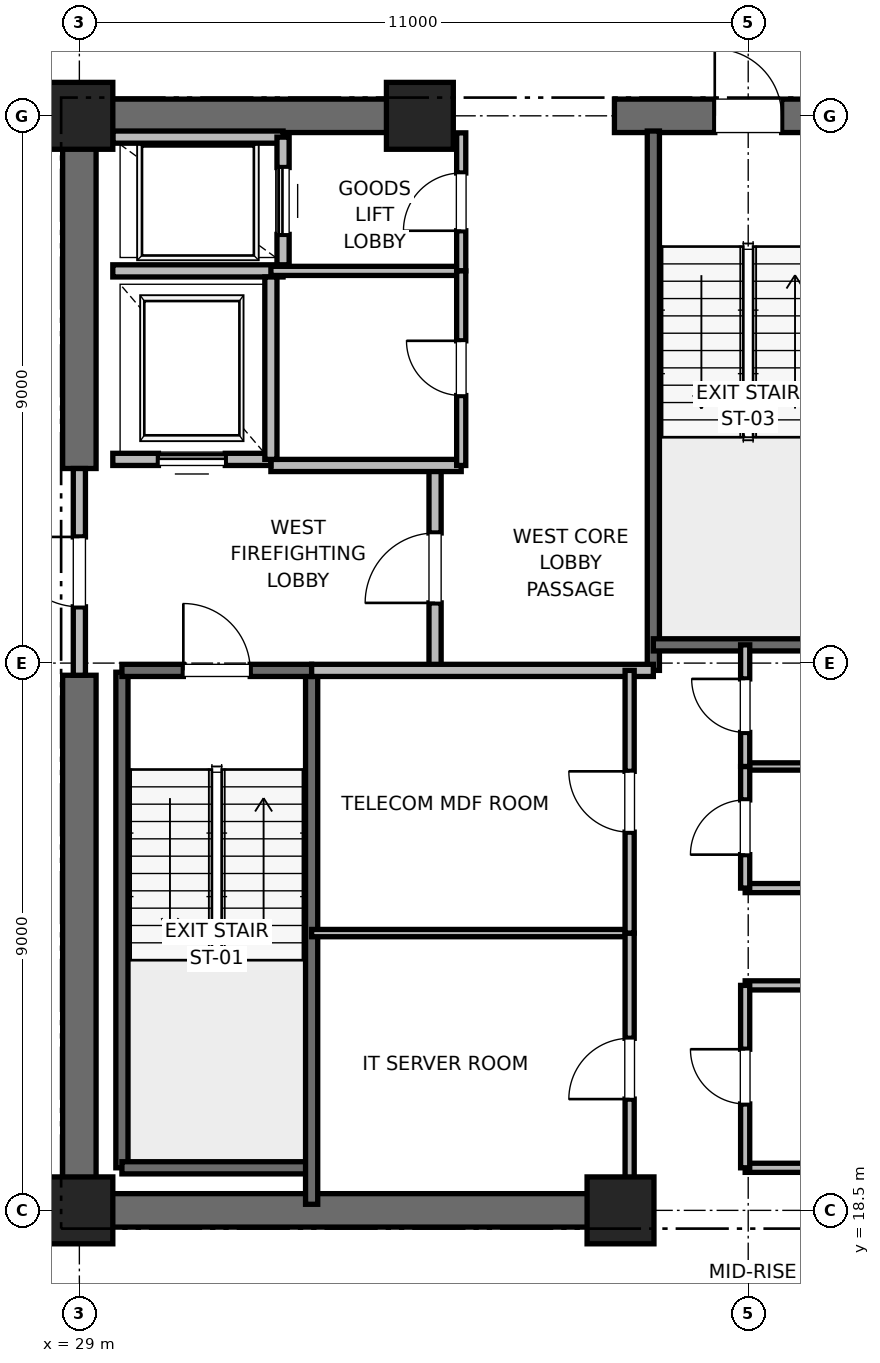
"""IFC4 building model, lengths in metres.
Left out: names, types, materials, properties, quantities, classifications, styles, units other than length and angle.
Written with IfcOpenShell. Run it as: python <this file> out.ifc"""

import sys

from ifc_helpers import new_model, si_unit, direction, frame, frame_2d, origin, origin_2d, place, context, subcontext, project, spatial, rectangle, extrude, element, fill, save


model = new_model("IFC4")
c1 = context("Model", 3, precision=1e-05, world=origin(), true_north=direction((0.0, 1.0)))
c2 = subcontext(c1, "Body", "Model", "MODEL_VIEW")
j1 = project(units=[si_unit("LENGTHUNIT", "METRE"), si_unit("PLANEANGLEUNIT", "RADIAN")], contexts=[c1])
p1 = place(None, origin())
s1 = spatial("IfcSite", under=j1, at=p1, CompositionType="ELEMENT")
p2 = place(p1, origin())
s2 = spatial("IfcBuilding", under=s1, at=p2, CompositionType="ELEMENT")
p3 = place(p2, frame((0.0, 0.0, 132.4)))
s3 = spatial("IfcBuildingStorey", under=s2, at=p3, CompositionType="ELEMENT", Elevation=132.4)
for number, where, z_axis, x_axis in (
    (1, (29.0, 18.5, 0.0), (0.0, 0.0, 1.0), (1.0, 0.0, 0.0)),
    (2, (29.0, 36.5, 0.0), (0.0, 0.0, 1.0), (1.0, 0.0, 0.0)),
    (3, (37.9, 18.5, 0.0), (0.0, 0.0, 1.0), (1.0, 0.0, 0.0)),
    (4, (34.6, 36.5, 0.0), (0.0, 0.0, 1.0), (1.0, 0.0, 0.0)),
):
    element("IfcColumn", number, at=place(p3, frame(where, z_axis=z_axis, x_axis=x_axis)), inside=s3, PredefinedType="PILASTER", context=c2, shape_type="SweptSolid", body=[
        extrude(rectangle(XDim=1.1, YDim=1.1, at=origin_2d()), origin(), (0.0, 0.0, 1.0), 4.0),
    ])
p4 = place(p3, frame((29.0, 18.5, 0.0), z_axis=(0.0, 0.0, 1.0), x_axis=(1.0, 0.0, 0.0)))
e5 = element("IfcWall", 5, at=p4, inside=s3, PredefinedType="SHEAR", context=c2, shape_type="SweptSolid", body=[
    extrude(rectangle(XDim=9.2, YDim=0.55, at=frame_2d((4.6, 0.0))), origin(), (0.0, 0.0, 1.0), 3.775),
])
p5 = place(p3, frame((29.0, 36.5, 0.0), z_axis=(0.0, 0.0, 1.0), x_axis=(1.0, 0.0, 0.0)))
e6 = element("IfcWall", 6, at=p5, inside=s3, PredefinedType="SHEAR", context=c2, shape_type="SweptSolid", body=[
    extrude(rectangle(XDim=5.8, YDim=0.55, at=frame_2d((2.9, 0.0))), origin(), (0.0, 0.0, 1.0), 3.775),
])
p6 = place(p3, frame((37.8, 36.5, 0.0), z_axis=(0.0, 0.0, 1.0), x_axis=(1.0, 0.0, 0.0)))
e7 = element("IfcWall", 7, at=p6, inside=s3, PredefinedType="SHEAR", context=c2, shape_type="SweptSolid", body=[
    extrude(rectangle(XDim=4.4, YDim=0.55, at=frame_2d((2.2, 0.0))), origin(), (0.0, 0.0, 1.0), 3.775),
])
p7 = place(p6, frame((1.65, 0.0, 0.0)))
e8 = element("IfcOpeningElement", 8, at=p7, cuts=e7, PredefinedType="OPENING", context=c2, shape_type="SweptSolid", body=[
    extrude(rectangle(XDim=1.1, YDim=2.15, at=frame_2d((0.55, 1.075))), frame((0.0, 0.275, 0.0), z_axis=(0.0, -1.0, 0.0), x_axis=(1.0, 0.0, 0.0)), (0.0, 0.0, 1.0), 0.55),
])
p8 = place(p3, frame((29.0, 18.5, 0.0), z_axis=(0.0, 0.0, 1.0), x_axis=(0.0, 1.0, 0.0)))
e9 = element("IfcWall", 9, at=p8, inside=s3, PredefinedType="SHEAR", context=c2, shape_type="SweptSolid", body=[
    extrude(rectangle(XDim=8.8, YDim=0.55, at=frame_2d((4.4, 0.0))), origin(), (0.0, 0.0, 1.0), 3.775),
])
p9 = place(p3, frame((29.0, 30.7, 0.0), z_axis=(0.0, 0.0, 1.0), x_axis=(0.0, 1.0, 0.0)))
e10 = element("IfcWall", 10, at=p9, inside=s3, PredefinedType="SHEAR", context=c2, shape_type="SweptSolid", body=[
    extrude(rectangle(XDim=5.8, YDim=0.55, at=frame_2d((2.9, 0.0))), origin(), (0.0, 0.0, 1.0), 3.775),
])
p10 = place(p3, frame((29.7, 19.2, 0.0), z_axis=(0.0, 0.0, 1.0), x_axis=(0.0, 1.0, 0.0)))
e11 = element("IfcWall", 11, at=p10, inside=s3, PredefinedType="SOLIDWALL", context=c2, shape_type="SweptSolid", body=[
    extrude(rectangle(XDim=8.15, YDim=0.2, at=frame_2d((4.075, 0.0))), origin(), (0.0, 0.0, 1.0), 3.775),
])
p11 = place(p3, frame((29.7, 19.2, 0.0), z_axis=(0.0, 0.0, 1.0), x_axis=(1.0, 0.0, 0.0)))
e12 = element("IfcWall", 12, at=p11, inside=s3, PredefinedType="SOLIDWALL", context=c2, shape_type="SweptSolid", body=[
    extrude(rectangle(XDim=3.12, YDim=0.2, at=frame_2d((1.56, 0.0))), origin(), (0.0, 0.0, 1.0), 3.775),
])
p12 = place(p3, frame((32.82, 18.6, 0.0), z_axis=(0.0, 0.0, 1.0), x_axis=(0.0, 1.0, 0.0)))
e13 = element("IfcWall", 13, at=p12, inside=s3, PredefinedType="SOLIDWALL", context=c2, shape_type="SweptSolid", body=[
    extrude(rectangle(XDim=8.78, YDim=0.2, at=frame_2d((4.39, 0.0))), origin(), (0.0, 0.0, 1.0), 3.775),
])
p13 = place(p3, frame((29.7, 27.38, 0.0), z_axis=(0.0, 0.0, 1.0), x_axis=(1.0, 0.0, 0.0)))
e14 = element("IfcWall", 14, at=p13, inside=s3, PredefinedType="SOLIDWALL", context=c2, shape_type="SweptSolid", body=[
    extrude(rectangle(XDim=3.12, YDim=0.2, at=frame_2d((1.56, 0.0))), origin(), (0.0, 0.0, 1.0), 3.775),
])
p14 = place(p13, frame((1.01, 0.0, 0.0)))
e15 = element("IfcOpeningElement", 15, at=p14, cuts=e14, PredefinedType="OPENING", context=c2, shape_type="SweptSolid", body=[
    extrude(rectangle(XDim=1.1, YDim=2.15, at=frame_2d((0.55, 1.075))), frame((0.0, 0.1, 0.0), z_axis=(0.0, -1.0, 0.0), x_axis=(1.0, 0.0, 0.0)), (0.0, 0.0, 1.0), 0.2),
])
p15 = place(p3, frame((38.44, 27.38, 0.0), z_axis=(0.0, 0.0, 1.0), x_axis=(0.0, 1.0, 0.0)))
e16 = element("IfcWall", 16, at=p15, inside=s3, PredefinedType="SOLIDWALL", context=c2, shape_type="SweptSolid", body=[
    extrude(rectangle(XDim=8.87, YDim=0.2, at=frame_2d((4.435, 0.0))), origin(), (0.0, 0.0, 1.0), 3.775),
])
p16 = place(p3, frame((38.44, 27.8, 0.0), z_axis=(0.0, 0.0, 1.0), x_axis=(1.0, 0.0, 0.0)))
e17 = element("IfcWall", 17, at=p16, inside=s3, PredefinedType="SOLIDWALL", context=c2, shape_type="SweptSolid", body=[
    extrude(rectangle(XDim=3.32, YDim=0.2, at=frame_2d((1.66, 0.0))), origin(), (0.0, 0.0, 1.0), 3.775),
])
p17 = place(p3, frame((34.85, 27.38, 0.0), z_axis=(0.0, 0.0, 1.0), x_axis=(0.0, 1.0, 0.0)))
e18 = element("IfcWall", 18, at=p17, inside=s3, PredefinedType="PARTITIONING", context=c2, shape_type="SweptSolid", body=[
    extrude(rectangle(XDim=3.37, YDim=0.2, at=frame_2d((1.685, 0.0))), origin(), (0.0, 0.0, 1.0), 3.775),
])
p18 = place(p17, frame((1.11, 0.0, 0.0)))
e19 = element("IfcOpeningElement", 19, at=p18, cuts=e18, PredefinedType="OPENING", context=c2, shape_type="SweptSolid", body=[
    extrude(rectangle(XDim=1.15, YDim=2.2, at=frame_2d((0.575, 1.1))), frame((0.0, 0.1, 0.0), z_axis=(0.0, -1.0, 0.0), x_axis=(1.0, 0.0, 0.0)), (0.0, 0.0, 1.0), 0.2),
])
p19 = place(p3, frame((29.0, 27.3, 0.0), z_axis=(0.0, 0.0, 1.0), x_axis=(0.0, 1.0, 0.0)))
e20 = element("IfcWall", 20, at=p19, inside=s3, PredefinedType="PARTITIONING", context=c2, shape_type="SweptSolid", body=[
    extrude(rectangle(XDim=3.4, YDim=0.2, at=frame_2d((1.7, 0.0))), origin(), (0.0, 0.0, 1.0), 2.755),
])
p20 = place(p19, frame((1.125, 0.0, 0.0)))
e21 = element("IfcOpeningElement", 21, at=p20, cuts=e20, PredefinedType="OPENING", context=c2, shape_type="SweptSolid", body=[
    extrude(rectangle(XDim=1.15, YDim=2.2, at=frame_2d((0.575, 1.1))), frame((0.0, 0.1, 0.0), z_axis=(0.0, -1.0, 0.0), x_axis=(1.0, 0.0, 0.0)), (0.0, 0.0, 1.0), 0.2),
])
p21 = place(p3, frame((32.82, 27.38, 0.0), z_axis=(0.0, 0.0, 1.0), x_axis=(1.0, 0.0, 0.0)))
e22 = element("IfcWall", 22, at=p21, inside=s3, PredefinedType="PARTITIONING", context=c2, shape_type="SweptSolid", body=[
    extrude(rectangle(XDim=5.62, YDim=0.2, at=frame_2d((2.81, 0.0))), origin(), (0.0, 0.0, 1.0), 3.775),
])
p22 = place(p3, frame((32.15, 30.75, 0.0), z_axis=(0.0, 0.0, 1.0), x_axis=(1.0, 0.0, 0.0)))
e23 = element("IfcWall", 23, at=p22, inside=s3, PredefinedType="PARTITIONING", context=c2, shape_type="SweptSolid", body=[
    extrude(rectangle(XDim=3.13, YDim=0.2, at=frame_2d((1.565, 0.0))), origin(), (0.0, 0.0, 1.0), 3.775),
])
p23 = place(p3, frame((29.55, 30.85, 0.0), z_axis=(0.0, 0.0, 1.0), x_axis=(1.0, 0.0, 0.0)))
e24 = element("IfcWall", 24, at=p23, inside=s3, PredefinedType="SOLIDWALL", context=c2, shape_type="SweptSolid", body=[
    extrude(rectangle(XDim=2.6, YDim=0.2, at=frame_2d((1.3, 0.0))), origin(), (0.0, 0.0, 1.0), 2.755),
])
p24 = place(p23, frame((0.75, 0.0, 0.0)))
e25 = element("IfcOpeningElement", 25, at=p24, cuts=e24, PredefinedType="OPENING", context=c2, shape_type="SweptSolid", body=[
    extrude(rectangle(XDim=1.1, YDim=2.2, at=frame_2d((0.55, 1.1))), frame((0.0, 0.1, 0.0), z_axis=(0.0, -1.0, 0.0), x_axis=(1.0, 0.0, 0.0)), (0.0, 0.0, 1.0), 0.2),
])
p25 = place(p3, frame((29.55, 33.95, 0.0), z_axis=(0.0, 0.0, 1.0), x_axis=(1.0, 0.0, 0.0)))
e26 = element("IfcWall", 26, at=p25, inside=s3, PredefinedType="SOLIDWALL", context=c2, shape_type="SweptSolid", body=[
    extrude(rectangle(XDim=2.8, YDim=0.2, at=frame_2d((1.4, 0.0))), origin(), (0.0, 0.0, 1.0), 3.775),
])
p26 = place(p3, frame((32.15, 30.85, 0.0), z_axis=(0.0, 0.0, 1.0), x_axis=(0.0, 1.0, 0.0)))
e27 = element("IfcWall", 27, at=p26, inside=s3, PredefinedType="SOLIDWALL", context=c2, shape_type="SweptSolid", body=[
    extrude(rectangle(XDim=3.0, YDim=0.2, at=frame_2d((1.5, 0.0))), origin(), (0.0, 0.0, 1.0), 3.775),
])
p27 = place(p3, frame((32.35, 36.15, 0.0), z_axis=(0.0, 0.0, 1.0), x_axis=(-1.0, 0.0, 0.0)))
e28 = element("IfcWall", 28, at=p27, inside=s3, PredefinedType="SOLIDWALL", context=c2, shape_type="SweptSolid", body=[
    extrude(rectangle(XDim=2.8, YDim=0.2, at=frame_2d((1.4, 0.0))), origin(), (0.0, 0.0, 1.0), 2.985),
])
p28 = place(p3, frame((32.35, 34.05, 0.0), z_axis=(0.0, 0.0, 1.0), x_axis=(0.0, 1.0, 0.0)))
e29 = element("IfcWall", 29, at=p28, inside=s3, PredefinedType="SOLIDWALL", context=c2, shape_type="SweptSolid", body=[
    extrude(rectangle(XDim=2.1, YDim=0.2, at=frame_2d((1.05, 0.0))), origin(), (0.0, 0.0, 1.0), 3.775),
])
p29 = place(p28, frame((0.5, 0.0, 0.0)))
e30 = element("IfcOpeningElement", 30, at=p29, cuts=e29, PredefinedType="OPENING", context=c2, shape_type="SweptSolid", body=[
    extrude(rectangle(XDim=1.1, YDim=2.2, at=frame_2d((0.55, 1.1))), frame((0.0, 0.1, 0.0), z_axis=(0.0, -1.0, 0.0), x_axis=(1.0, 0.0, 0.0)), (0.0, 0.0, 1.0), 0.2),
])
for number, where, z_axis, x_axis in (
    (31, (39.95, 19.2, 0.0), (0.0, 0.0, 1.0), (1.0, 0.0, 0.0)),
    (32, (39.95, 22.2, 0.0), (0.0, 0.0, 1.0), (1.0, 0.0, 0.0)),
    (33, (39.95, 23.8, 0.0), (0.0, 0.0, 1.0), (1.0, 0.0, 0.0)),
):
    element("IfcWall", number, at=place(p3, frame(where, z_axis=z_axis, x_axis=x_axis)), inside=s3, PredefinedType="PARTITIONING", context=c2, shape_type="SweptSolid", body=[
        extrude(rectangle(XDim=1.81, YDim=0.15, at=frame_2d((0.905, 0.0))), origin(), (0.0, 0.0, 1.0), 2.85),
    ])
p30 = place(p3, frame((39.95, 25.8, 0.0), z_axis=(0.0, 0.0, 1.0), x_axis=(1.0, 0.0, 0.0)))
e34 = element("IfcWall", 34, at=p30, inside=s3, PredefinedType="PARTITIONING", context=c2, shape_type="SweptSolid", body=[
    extrude(rectangle(XDim=1.81, YDim=0.12, at=frame_2d((0.905, 0.0))), origin(), (0.0, 0.0, 1.0), 2.85),
])
p31 = place(p3, frame((39.95, 19.2, 0.0), z_axis=(0.0, 0.0, 1.0), x_axis=(0.0, 1.0, 0.0)))
e35 = element("IfcWall", 35, at=p31, inside=s3, PredefinedType="PARTITIONING", context=c2, shape_type="SweptSolid", body=[
    extrude(rectangle(XDim=3.0, YDim=0.15, at=frame_2d((1.5, 0.0))), origin(), (0.0, 0.0, 1.0), 2.85),
])
p32 = place(p31, frame((1.05, 0.0, 0.0)))
e36 = element("IfcOpeningElement", 36, at=p32, cuts=e35, PredefinedType="OPENING", context=c2, shape_type="SweptSolid", body=[
    extrude(rectangle(XDim=0.9, YDim=2.1, at=frame_2d((0.45, 1.05))), frame((0.0, 0.075, 0.0), z_axis=(0.0, -1.0, 0.0), x_axis=(1.0, 0.0, 0.0)), (0.0, 0.0, 1.0), 0.15),
])
p33 = place(p3, frame((39.95, 23.8, 0.0), z_axis=(0.0, 0.0, 1.0), x_axis=(0.0, 1.0, 0.0)))
e37 = element("IfcWall", 37, at=p33, inside=s3, PredefinedType="PARTITIONING", context=c2, shape_type="SweptSolid", body=[
    extrude(rectangle(XDim=2.0, YDim=0.15, at=frame_2d((1.0, 0.0))), origin(), (0.0, 0.0, 1.0), 2.85),
])
p34 = place(p33, frame((0.55, 0.0, 0.0)))
e38 = element("IfcOpeningElement", 38, at=p34, cuts=e37, PredefinedType="OPENING", context=c2, shape_type="SweptSolid", body=[
    extrude(rectangle(XDim=0.9, YDim=2.1, at=frame_2d((0.45, 1.05))), frame((0.0, 0.075, 0.0), z_axis=(0.0, -1.0, 0.0), x_axis=(1.0, 0.0, 0.0)), (0.0, 0.0, 1.0), 0.15),
])
p35 = place(p3, frame((39.95, 25.8, 0.0), z_axis=(0.0, 0.0, 1.0), x_axis=(0.0, 1.0, 0.0)))
e39 = element("IfcWall", 39, at=p35, inside=s3, PredefinedType="PARTITIONING", context=c2, shape_type="SweptSolid", body=[
    extrude(rectangle(XDim=2.0, YDim=0.15, at=frame_2d((1.0, 0.0))), origin(), (0.0, 0.0, 1.0), 2.85),
])
p36 = place(p35, frame((0.56, 0.0, 0.0)))
e40 = element("IfcOpeningElement", 40, at=p36, cuts=e39, PredefinedType="OPENING", context=c2, shape_type="SweptSolid", body=[
    extrude(rectangle(XDim=0.88, YDim=2.1, at=frame_2d((0.44, 1.05))), frame((0.0, 0.075, 0.0), z_axis=(0.0, -1.0, 0.0), x_axis=(1.0, 0.0, 0.0)), (0.0, 0.0, 1.0), 0.15),
])
p37 = place(p3, frame((32.15, 33.95, 0.0), z_axis=(0.0, 0.0, 1.0), x_axis=(1.0, 0.0, 0.0)))
e41 = element("IfcWall", 41, at=p37, inside=s3, PredefinedType="PARTITIONING", context=c2, shape_type="SweptSolid", body=[
    extrude(rectangle(XDim=3.13, YDim=0.15, at=frame_2d((1.565, 0.0))), origin(), (0.0, 0.0, 1.0), 2.85),
])
p38 = place(p3, frame((35.28, 33.95, 0.0), z_axis=(0.0, 0.0, 1.0), x_axis=(0.0, 1.0, 0.0)))
e42 = element("IfcWall", 42, at=p38, inside=s3, PredefinedType="PARTITIONING", context=c2, shape_type="SweptSolid", body=[
    extrude(rectangle(XDim=2.27, YDim=0.15, at=frame_2d((1.135, 0.0))), origin(), (0.0, 0.0, 1.0), 2.755),
])
p39 = place(p38, frame((0.66, 0.0, 0.0)))
e43 = element("IfcOpeningElement", 43, at=p39, cuts=e42, PredefinedType="OPENING", context=c2, shape_type="SweptSolid", body=[
    extrude(rectangle(XDim=0.95, YDim=2.15, at=frame_2d((0.475, 1.075))), frame((0.0, 0.075, 0.0), z_axis=(0.0, -1.0, 0.0), x_axis=(1.0, 0.0, 0.0)), (0.0, 0.0, 1.0), 0.15),
])
p40 = place(p3, frame((35.28, 30.75, 0.0), z_axis=(0.0, 0.0, 1.0), x_axis=(0.0, 1.0, 0.0)))
e44 = element("IfcWall", 44, at=p40, inside=s3, PredefinedType="PARTITIONING", context=c2, shape_type="SweptSolid", body=[
    extrude(rectangle(XDim=3.2, YDim=0.15, at=frame_2d((1.6, 0.0))), origin(), (0.0, 0.0, 1.0), 2.85),
])
p41 = place(p40, frame((1.15, 0.0, 0.0)))
e45 = element("IfcOpeningElement", 45, at=p41, cuts=e44, PredefinedType="OPENING", context=c2, shape_type="SweptSolid", body=[
    extrude(rectangle(XDim=0.9, YDim=2.1, at=frame_2d((0.45, 1.05))), frame((0.0, 0.075, 0.0), z_axis=(0.0, -1.0, 0.0), x_axis=(1.0, 0.0, 0.0)), (0.0, 0.0, 1.0), 0.15),
])
p42 = place(p3, frame((32.82, 23.06, 0.0), z_axis=(0.0, 0.0, 1.0), x_axis=(1.0, 0.0, 0.0)))
e46 = element("IfcWall", 46, at=p42, inside=s3, PredefinedType="PARTITIONING", context=c2, shape_type="SweptSolid", body=[
    extrude(rectangle(XDim=5.23, YDim=0.12, at=frame_2d((2.615, 0.0))), origin(), (0.0, 0.0, 1.0), 2.85),
])
p43 = place(p3, frame((38.05, 18.6, 0.0), z_axis=(0.0, 0.0, 1.0), x_axis=(0.0, 1.0, 0.0)))
e47 = element("IfcWall", 47, at=p43, inside=s3, PredefinedType="PARTITIONING", context=c2, shape_type="SweptSolid", body=[
    extrude(rectangle(XDim=4.46, YDim=0.15, at=frame_2d((2.23, 0.0))), origin(), (0.0, 0.0, 1.0), 2.755),
])
p44 = place(p43, frame((1.73, 0.0, 0.0)))
e48 = element("IfcOpeningElement", 48, at=p44, cuts=e47, PredefinedType="OPENING", context=c2, shape_type="SweptSolid", body=[
    extrude(rectangle(XDim=1.0, YDim=2.15, at=frame_2d((0.5, 1.075))), frame((0.0, 0.075, 0.0), z_axis=(0.0, -1.0, 0.0), x_axis=(1.0, 0.0, 0.0)), (0.0, 0.0, 1.0), 0.15),
])
p45 = place(p3, frame((38.05, 23.06, 0.0), z_axis=(0.0, 0.0, 1.0), x_axis=(0.0, 1.0, 0.0)))
e49 = element("IfcWall", 49, at=p45, inside=s3, PredefinedType="PARTITIONING", context=c2, shape_type="SweptSolid", body=[
    extrude(rectangle(XDim=4.32, YDim=0.15, at=frame_2d((2.16, 0.0))), origin(), (0.0, 0.0, 1.0), 2.85),
])
p46 = place(p45, frame((1.66, 0.0, 0.0)))
e50 = element("IfcOpeningElement", 50, at=p46, cuts=e49, PredefinedType="OPENING", context=c2, shape_type="SweptSolid", body=[
    extrude(rectangle(XDim=1.0, YDim=2.15, at=frame_2d((0.5, 1.075))), frame((0.0, 0.075, 0.0), z_axis=(0.0, -1.0, 0.0), x_axis=(1.0, 0.0, 0.0)), (0.0, 0.0, 1.0), 0.15),
])
p47 = place(p14, origin())
e51 = element("IfcDoor", 51, at=p47, inside=s3, OperationType="SINGLE_SWING_LEFT", PredefinedType="DOOR", context=c2, shape_type="SweptSolid", body=[
    extrude(rectangle(XDim=1.1, YDim=2.15, at=frame_2d((0.55, 1.075))), frame((0.0, 0.025, 0.0), z_axis=(0.0, -1.0, 0.0), x_axis=(1.0, 0.0, 0.0)), (0.0, 0.0, 1.0), 0.05),
])
fill(e15, e51)
p48 = place(p7, origin())
e52 = element("IfcDoor", 52, at=p48, inside=s3, OperationType="SINGLE_SWING_LEFT", PredefinedType="DOOR", context=c2, shape_type="SweptSolid", body=[
    extrude(rectangle(XDim=1.1, YDim=2.15, at=frame_2d((0.55, 1.075))), frame((0.0, 0.025, 0.0), z_axis=(0.0, -1.0, 0.0), x_axis=(1.0, 0.0, 0.0)), (0.0, 0.0, 1.0), 0.05),
])
fill(e8, e52)
p49 = place(p18, origin())
e53 = element("IfcDoor", 53, at=p49, inside=s3, OperationType="SINGLE_SWING_LEFT", PredefinedType="DOOR", context=c2, shape_type="SweptSolid", body=[
    extrude(rectangle(XDim=1.15, YDim=2.2, at=frame_2d((0.575, 1.1))), frame((0.0, 0.025, 0.0), z_axis=(0.0, -1.0, 0.0), x_axis=(1.0, 0.0, 0.0)), (0.0, 0.0, 1.0), 0.05),
])
fill(e19, e53)
p50 = place(p20, origin())
e54 = element("IfcDoor", 54, at=p50, inside=s3, OperationType="SINGLE_SWING_RIGHT", PredefinedType="DOOR", context=c2, shape_type="SweptSolid", body=[
    extrude(rectangle(XDim=1.15, YDim=2.2, at=frame_2d((0.575, 1.1))), frame((0.0, 0.025, 0.0), z_axis=(0.0, -1.0, 0.0), x_axis=(1.0, 0.0, 0.0)), (0.0, 0.0, 1.0), 0.05),
])
fill(e21, e54)
p51 = place(p24, origin())
e55 = element("IfcDoor", 55, at=p51, inside=s3, OperationType="SLIDING_TO_RIGHT", PredefinedType="DOOR", context=c2, shape_type="SweptSolid", body=[
    extrude(rectangle(XDim=1.1, YDim=2.2, at=frame_2d((0.55, 1.1))), frame((0.0, 0.025, 0.0), z_axis=(0.0, -1.0, 0.0), x_axis=(1.0, 0.0, 0.0)), (0.0, 0.0, 1.0), 0.05),
])
fill(e25, e55)
p52 = place(p29, origin())
e56 = element("IfcDoor", 56, at=p52, inside=s3, OperationType="SLIDING_TO_RIGHT", PredefinedType="DOOR", context=c2, shape_type="SweptSolid", body=[
    extrude(rectangle(XDim=1.1, YDim=2.2, at=frame_2d((0.55, 1.1))), frame((0.0, 0.025, 0.0), z_axis=(0.0, -1.0, 0.0), x_axis=(1.0, 0.0, 0.0)), (0.0, 0.0, 1.0), 0.05),
])
fill(e30, e56)
p53 = place(p32, origin())
e57 = element("IfcDoor", 57, at=p53, inside=s3, OperationType="SINGLE_SWING_RIGHT", PredefinedType="DOOR", context=c2, shape_type="SweptSolid", body=[
    extrude(rectangle(XDim=0.9, YDim=2.1, at=frame_2d((0.45, 1.05))), frame((0.0, 0.025, 0.0), z_axis=(0.0, -1.0, 0.0), x_axis=(1.0, 0.0, 0.0)), (0.0, 0.0, 1.0), 0.05),
])
fill(e36, e57)
p54 = place(p34, origin())
e58 = element("IfcDoor", 58, at=p54, inside=s3, OperationType="SINGLE_SWING_LEFT", PredefinedType="DOOR", context=c2, shape_type="SweptSolid", body=[
    extrude(rectangle(XDim=0.9, YDim=2.1, at=frame_2d((0.45, 1.05))), frame((0.0, 0.025, 0.0), z_axis=(0.0, -1.0, 0.0), x_axis=(1.0, 0.0, 0.0)), (0.0, 0.0, 1.0), 0.05),
])
fill(e38, e58)
p55 = place(p36, origin())
e59 = element("IfcDoor", 59, at=p55, inside=s3, OperationType="SINGLE_SWING_RIGHT", PredefinedType="DOOR", context=c2, shape_type="SweptSolid", body=[
    extrude(rectangle(XDim=0.88, YDim=2.1, at=frame_2d((0.44, 1.05))), frame((0.0, 0.025, 0.0), z_axis=(0.0, -1.0, 0.0), x_axis=(1.0, 0.0, 0.0)), (0.0, 0.0, 1.0), 0.05),
])
fill(e40, e59)
p56 = place(p39, origin())
e60 = element("IfcDoor", 60, at=p56, inside=s3, OperationType="SINGLE_SWING_LEFT", PredefinedType="DOOR", context=c2, shape_type="SweptSolid", body=[
    extrude(rectangle(XDim=0.95, YDim=2.15, at=frame_2d((0.475, 1.075))), frame((0.0, 0.025, 0.0), z_axis=(0.0, -1.0, 0.0), x_axis=(1.0, 0.0, 0.0)), (0.0, 0.0, 1.0), 0.05),
])
fill(e43, e60)
p57 = place(p41, origin())
e61 = element("IfcDoor", 61, at=p57, inside=s3, OperationType="SINGLE_SWING_RIGHT", PredefinedType="DOOR", context=c2, shape_type="SweptSolid", body=[
    extrude(rectangle(XDim=0.9, YDim=2.1, at=frame_2d((0.45, 1.05))), frame((0.0, 0.025, 0.0), z_axis=(0.0, -1.0, 0.0), x_axis=(1.0, 0.0, 0.0)), (0.0, 0.0, 1.0), 0.05),
])
fill(e45, e61)
p58 = place(p44, origin())
e62 = element("IfcDoor", 62, at=p58, inside=s3, OperationType="SINGLE_SWING_LEFT", PredefinedType="DOOR", context=c2, shape_type="SweptSolid", body=[
    extrude(rectangle(XDim=1.0, YDim=2.15, at=frame_2d((0.5, 1.075))), frame((0.0, 0.025, 0.0), z_axis=(0.0, -1.0, 0.0), x_axis=(1.0, 0.0, 0.0)), (0.0, 0.0, 1.0), 0.05),
])
fill(e48, e62)
p59 = place(p46, origin())
e63 = element("IfcDoor", 63, at=p59, inside=s3, OperationType="SINGLE_SWING_RIGHT", PredefinedType="DOOR", context=c2, shape_type="SweptSolid", body=[
    extrude(rectangle(XDim=1.0, YDim=2.15, at=frame_2d((0.5, 1.075))), frame((0.0, 0.025, 0.0), z_axis=(0.0, -1.0, 0.0), x_axis=(1.0, 0.0, 0.0)), (0.0, 0.0, 1.0), 0.05),
])
fill(e50, e63)
save(model, sys.argv[1])
